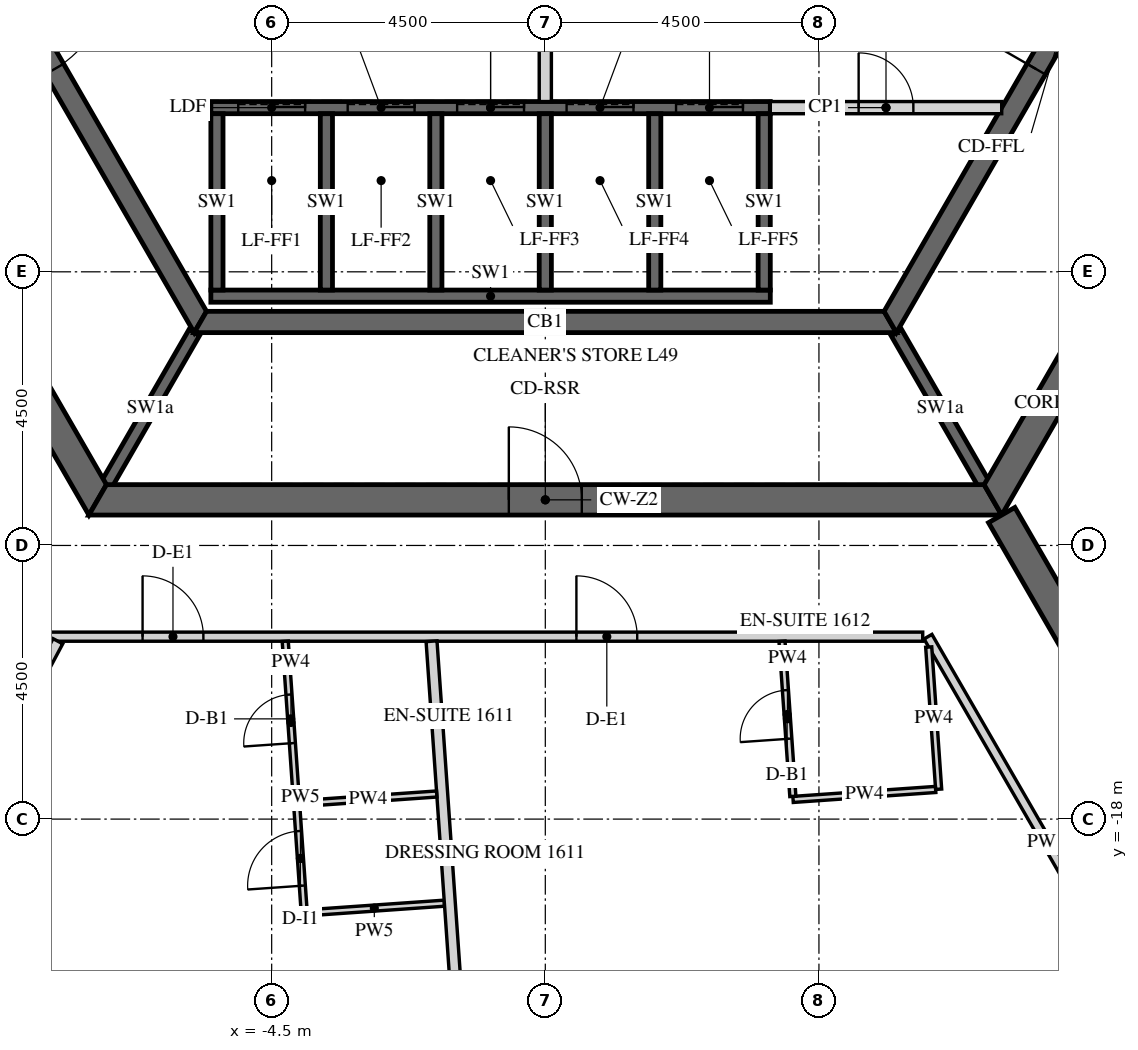
"""IFC4 building model, lengths in metres.
Left out: names, types, materials, properties, quantities, classifications, styles, units other than length and angle.
Written with IfcOpenShell. Run it as: python <this file> out.ifc"""

import sys

from ifc_helpers import new_model, si_unit, direction, frame, frame_2d, origin, place, context, subcontext, project, spatial, polyline, rectangle, outline, extrude, element, fill, save


model = new_model("IFC4")
c1 = context("Model", 3, precision=1e-05, world=origin(), true_north=direction((0.0, 1.0)))
c2 = subcontext(c1, "Body", "Model", "MODEL_VIEW")
j1 = project(units=[si_unit("LENGTHUNIT", "METRE"), si_unit("PLANEANGLEUNIT", "RADIAN")], contexts=[c1])
p1 = place(None, origin())
s1 = spatial("IfcSite", under=j1, at=p1, CompositionType="ELEMENT")
p2 = place(p1, origin())
s2 = spatial("IfcBuilding", under=s1, at=p2, CompositionType="ELEMENT")
p3 = place(p2, frame((0.0, 0.0, 207.3)))
s3 = spatial("IfcBuildingStorey", under=s2, at=p3, CompositionType="ELEMENT", Elevation=207.3)
p4 = place(p3, frame((-14.722, 0.0, -0.15), z_axis=(0.0, 0.0, 1.0), x_axis=(0.50000571537, -0.866022103989, 0.0)))
e1 = element("IfcWall", 1, at=p4, inside=s3, PredefinedType="SHEAR", context=c2, shape_type="SweptSolid", body=[
    extrude(outline(polyline([(-0.144, -0.25), (14.867, -0.25), (14.578, 0.25), (0.144, 0.25), (-0.144, -0.25)])), origin(), (0.0, 0.0, 1.0), 3.9),
])
p5 = place(p4, frame((6.432, 0.0, 0.15)))
e2 = element("IfcOpeningElement", 2, at=p5, cuts=e1, PredefinedType="OPENING", context=c2, shape_type="SweptSolid", body=[
    extrude(rectangle(XDim=1.8, YDim=2.4, at=frame_2d((0.9, 1.2))), frame((0.0, 0.26, 0.0), z_axis=(0.0, -1.0, 0.0), x_axis=(1.0, 0.0, 0.0)), (0.0, 0.0, 1.0), 0.52),
])
p6 = place(p3, frame((-7.361, -12.75, -0.15), z_axis=(0.0, 0.0, 1.0), x_axis=(1.0, 0.0, 0.0)))
e3 = element("IfcWall", 3, at=p6, inside=s3, PredefinedType="SHEAR", context=c2, shape_type="SweptSolid", body=[
    extrude(outline(polyline([(-0.144, -0.25), (14.866, -0.25), (14.578, 0.25), (0.144, 0.25), (-0.144, -0.25)])), origin(), (0.0, 0.0, 1.0), 3.9),
])
p7 = place(p6, frame((6.761, 0.0, 0.15)))
e4 = element("IfcOpeningElement", 4, at=p7, cuts=e3, PredefinedType="OPENING", context=c2, shape_type="SweptSolid", body=[
    extrude(rectangle(XDim=1.2, YDim=2.4, at=frame_2d((0.6, 1.2))), frame((0.0, 0.26, 0.0), z_axis=(0.0, -1.0, 0.0), x_axis=(1.0, 0.0, 0.0)), (0.0, 0.0, 1.0), 0.52),
])
p8 = place(p3, frame((7.361, -12.75, -0.15), z_axis=(0.0, 0.0, 1.0), x_axis=(0.50000571537, 0.866022103989, 0.0)))
e5 = element("IfcWall", 5, at=p8, inside=s3, PredefinedType="SHEAR", context=c2, shape_type="SweptSolid", body=[
    extrude(outline(polyline([(-0.144, -0.25), (14.867, -0.25), (14.578, 0.25), (0.144, 0.25), (-0.144, -0.25)])), origin(), (0.0, 0.0, 1.0), 3.9),
])
p9 = place(p8, frame((6.49, 0.0, 0.15)))
e6 = element("IfcOpeningElement", 6, at=p9, cuts=e5, PredefinedType="OPENING", context=c2, shape_type="SweptSolid", body=[
    extrude(rectangle(XDim=1.8, YDim=2.4, at=frame_2d((0.9, 1.2))), frame((0.0, 0.26, 0.0), z_axis=(0.0, -1.0, 0.0), x_axis=(1.0, 0.0, 0.0)), (0.0, 0.0, 1.0), 0.52),
])
p10 = place(p3, frame((7.506, -13.0, -0.15), z_axis=(0.0, 0.0, 1.0), x_axis=(0.499988271576, -0.866032175087, 0.0)))
e7 = element("IfcWall", 7, at=p10, inside=s3, PredefinedType="SHEAR", context=c2, shape_type="SweptSolid", body=[
    extrude(rectangle(XDim=15.424, YDim=0.5, at=frame_2d((7.712, 0.0))), origin(), (0.0, 0.0, 1.0), 3.9),
])
p11 = place(p10, frame((6.812, 0.0, 0.15)))
e8 = element("IfcOpeningElement", 8, at=p11, cuts=e7, PredefinedType="OPENING", context=c2, shape_type="SweptSolid", body=[
    extrude(rectangle(XDim=1.8, YDim=2.4, at=frame_2d((0.9, 1.2))), frame((0.0, 0.26, 0.0), z_axis=(0.0, -1.0, 0.0), x_axis=(1.0, 0.0, 0.0)), (0.0, 0.0, 1.0), 0.52),
])
p12 = place(p3, frame((-11.345, 0.0, -0.15), z_axis=(0.0, 0.0, 1.0), x_axis=(0.499995046907, -0.866028263435, 0.0)))
e9 = element("IfcWall", 9, at=p12, inside=s3, PredefinedType="SHEAR", context=c2, shape_type="SweptSolid", body=[
    extrude(outline(polyline([(-0.101, -0.175), (11.446, -0.175), (11.244, 0.175), (0.101, 0.175), (-0.101, -0.175)])), origin(), (0.0, 0.0, 1.0), 3.9),
])
p13 = place(p12, frame((4.744, 0.0, 0.15)))
e10 = element("IfcOpeningElement", 10, at=p13, cuts=e9, PredefinedType="OPENING", context=c2, shape_type="SweptSolid", body=[
    extrude(rectangle(XDim=1.8, YDim=2.4, at=frame_2d((0.9, 1.2))), frame((0.0, 0.185, 0.0), z_axis=(0.0, -1.0, 0.0), x_axis=(1.0, 0.0, 0.0)), (0.0, 0.0, 1.0), 0.37),
])
p14 = place(p3, frame((-5.673, -9.825, -0.15), z_axis=(0.0, 0.0, 1.0), x_axis=(1.0, 0.0, 0.0)))
e11 = element("IfcWall", 11, at=p14, inside=s3, PredefinedType="SHEAR", context=c2, shape_type="SweptSolid", body=[
    extrude(outline(polyline([(-0.101, -0.175), (11.446, -0.175), (11.244, 0.175), (0.101, 0.175), (-0.101, -0.175)])), origin(), (0.0, 0.0, 1.0), 3.9),
])
p15 = place(p3, frame((5.673, -9.825, -0.15), z_axis=(0.0, 0.0, 1.0), x_axis=(0.499995046907, 0.866028263435, 0.0)))
e12 = element("IfcWall", 12, at=p15, inside=s3, PredefinedType="SHEAR", context=c2, shape_type="SweptSolid", body=[
    extrude(outline(polyline([(-0.101, -0.175), (11.446, -0.175), (11.244, 0.175), (0.101, 0.175), (-0.101, -0.175)])), origin(), (0.0, 0.0, 1.0), 3.9),
])
p16 = place(p15, frame((4.801, 0.0, 0.15)))
e13 = element("IfcOpeningElement", 13, at=p16, cuts=e12, PredefinedType="OPENING", context=c2, shape_type="SweptSolid", body=[
    extrude(rectangle(XDim=1.8, YDim=2.4, at=frame_2d((0.9, 1.2))), frame((0.0, 0.185, 0.0), z_axis=(0.0, -1.0, 0.0), x_axis=(1.0, 0.0, 0.0)), (0.0, 0.0, 1.0), 0.37),
])
p17 = place(p3, frame((-5.5, -6.3, -0.25), z_axis=(0.0, 0.0, 1.0), x_axis=(1.0, 0.0, 0.0)))
e14 = element("IfcWall", 14, at=p17, inside=s3, PredefinedType="SHEAR", context=c2, shape_type="SweptSolid", body=[
    extrude(rectangle(XDim=9.2, YDim=0.2, at=frame_2d((4.6, 0.0))), origin(), (0.0, 0.0, 1.0), 3.9),
])
p18 = place(p17, frame((0.45, 0.0, 0.25)))
e15 = element("IfcOpeningElement", 15, at=p18, cuts=e14, PredefinedType="OPENING", context=c2, shape_type="SweptSolid", body=[
    extrude(rectangle(XDim=1.1, YDim=2.1, at=frame_2d((0.55, 1.05))), frame((0.0, 0.11, 0.0), z_axis=(0.0, -1.0, 0.0), x_axis=(1.0, 0.0, 0.0)), (0.0, 0.0, 1.0), 0.22),
])
p19 = place(p17, frame((2.25, 0.0, 0.25)))
e16 = element("IfcOpeningElement", 16, at=p19, cuts=e14, PredefinedType="OPENING", context=c2, shape_type="SweptSolid", body=[
    extrude(rectangle(XDim=1.1, YDim=2.1, at=frame_2d((0.55, 1.05))), frame((0.0, 0.11, 0.0), z_axis=(0.0, -1.0, 0.0), x_axis=(1.0, 0.0, 0.0)), (0.0, 0.0, 1.0), 0.22),
])
p20 = place(p17, frame((4.05, 0.0, 0.25)))
e17 = element("IfcOpeningElement", 17, at=p20, cuts=e14, PredefinedType="OPENING", context=c2, shape_type="SweptSolid", body=[
    extrude(rectangle(XDim=1.1, YDim=2.1, at=frame_2d((0.55, 1.05))), frame((0.0, 0.11, 0.0), z_axis=(0.0, -1.0, 0.0), x_axis=(1.0, 0.0, 0.0)), (0.0, 0.0, 1.0), 0.22),
])
p21 = place(p17, frame((5.85, 0.0, 0.25)))
e18 = element("IfcOpeningElement", 18, at=p21, cuts=e14, PredefinedType="OPENING", context=c2, shape_type="SweptSolid", body=[
    extrude(rectangle(XDim=1.1, YDim=2.1, at=frame_2d((0.55, 1.05))), frame((0.0, 0.11, 0.0), z_axis=(0.0, -1.0, 0.0), x_axis=(1.0, 0.0, 0.0)), (0.0, 0.0, 1.0), 0.22),
])
p22 = place(p17, frame((7.65, 0.0, 0.25)))
e19 = element("IfcOpeningElement", 19, at=p22, cuts=e14, PredefinedType="OPENING", context=c2, shape_type="SweptSolid", body=[
    extrude(rectangle(XDim=1.1, YDim=2.1, at=frame_2d((0.55, 1.05))), frame((0.0, 0.11, 0.0), z_axis=(0.0, -1.0, 0.0), x_axis=(1.0, 0.0, 0.0)), (0.0, 0.0, 1.0), 0.22),
])
p23 = place(p3, frame((-5.5, -9.4, -0.25), z_axis=(0.0, 0.0, 1.0), x_axis=(1.0, 0.0, 0.0)))
e20 = element("IfcWall", 20, at=p23, inside=s3, PredefinedType="SHEAR", context=c2, shape_type="SweptSolid", body=[
    extrude(rectangle(XDim=9.2, YDim=0.2, at=frame_2d((4.6, 0.0))), origin(), (0.0, 0.0, 1.0), 3.9),
])
for number, where, z_axis, x_axis in (
    (21, (-5.4, -9.3, -0.25), (0.0, 0.0, 1.0), (0.0, 1.0, 0.0)),
    (22, (-3.6, -9.3, -0.25), (0.0, 0.0, 1.0), (0.0, 1.0, 0.0)),
    (23, (-1.8, -9.3, -0.25), (0.0, 0.0, 1.0), (0.0, 1.0, 0.0)),
    (24, (0.0, -9.3, -0.25), (0.0, 0.0, 1.0), (0.0, 1.0, 0.0)),
    (25, (1.8, -9.3, -0.25), (0.0, 0.0, 1.0), (0.0, 1.0, 0.0)),
    (26, (3.6, -9.3, -0.25), (0.0, 0.0, 1.0), (0.0, 1.0, 0.0)),
):
    element("IfcWall", number, at=place(p3, frame(where, z_axis=z_axis, x_axis=x_axis)), inside=s3, PredefinedType="SHEAR", context=c2, shape_type="SweptSolid", body=[
        extrude(rectangle(XDim=2.9, YDim=0.2, at=frame_2d((1.45, 0.0))), origin(), (0.0, 0.0, 1.0), 3.9),
    ])
p24 = place(p3, frame((0.0, -6.2, 0.0), z_axis=(0.0, 0.0, 1.0), x_axis=(0.0, 1.0, 0.0)))
e27 = element("IfcWall", 27, at=p24, inside=s3, PredefinedType="PARTITIONING", context=c2, shape_type="SweptSolid", body=[
    extrude(rectangle(XDim=6.1, YDim=0.2, at=frame_2d((3.05, 0.0))), origin(), (0.0, 0.0, 1.0), 3.65),
])
p25 = place(p3, frame((3.7, -6.3, 0.0), z_axis=(0.0, 0.0, 1.0), x_axis=(1.0, 0.0, 0.0)))
e28 = element("IfcWall", 28, at=p25, inside=s3, PredefinedType="PARTITIONING", context=c2, shape_type="SweptSolid", body=[
    extrude(rectangle(XDim=3.806, YDim=0.2, at=frame_2d((1.903, 0.0))), origin(), (0.0, 0.0, 1.0), 3.65),
])
p26 = place(p25, frame((1.453, 0.0, 0.0)))
e29 = element("IfcOpeningElement", 29, at=p26, cuts=e28, PredefinedType="OPENING", context=c2, shape_type="SweptSolid", body=[
    extrude(rectangle(XDim=0.9, YDim=2.1, at=frame_2d((0.45, 1.05))), frame((0.0, 0.11, 0.0), z_axis=(0.0, -1.0, 0.0), x_axis=(1.0, 0.0, 0.0)), (0.0, 0.0, 1.0), 0.22),
])
for number, where, z_axis, x_axis in (
    (30, (-5.773, -10.0, -0.15), (0.0, 0.0, 1.0), (-0.5, -0.866, 0.0)),
    (31, (5.773, -10.0, -0.15), (0.0, 0.0, 1.0), (0.5, -0.866, 0.0)),
):
    element("IfcWall", number, at=place(p3, frame(where, z_axis=z_axis, x_axis=x_axis)), inside=s3, PredefinedType="SHEAR", context=c2, shape_type="SweptSolid", body=[
        extrude(rectangle(XDim=2.887, YDim=0.2, at=frame_2d((1.443, 0.0))), origin(), (0.0, 0.0, 1.0), 3.9),
    ])
p27 = place(p3, frame((-8.574, -15.0, 0.0), z_axis=(0.0, 0.0, 1.0), x_axis=(1.0, 0.0, 0.0)))
e32 = element("IfcWall", 32, at=p27, inside=s3, PredefinedType="PARTITIONING", context=c2, shape_type="SweptSolid", body=[
    extrude(rectangle(XDim=14.78, YDim=0.15, at=frame_2d((7.39, 0.0))), origin(), (0.0, 0.0, 1.0), 2.988),
])
p28 = place(p27, frame((1.951, 0.0, 0.0)))
e33 = element("IfcOpeningElement", 33, at=p28, cuts=e32, PredefinedType="OPENING", context=c2, shape_type="SweptSolid", body=[
    extrude(rectangle(XDim=1.0, YDim=2.1, at=frame_2d((0.5, 1.05))), frame((0.0, 0.085, 0.0), z_axis=(0.0, -1.0, 0.0), x_axis=(1.0, 0.0, 0.0)), (0.0, 0.0, 1.0), 0.17),
])
p29 = place(p27, frame((9.085, 0.0, 0.0)))
e34 = element("IfcOpeningElement", 34, at=p29, cuts=e32, PredefinedType="OPENING", context=c2, shape_type="SweptSolid", body=[
    extrude(rectangle(XDim=1.0, YDim=2.1, at=frame_2d((0.5, 1.05))), frame((0.0, 0.085, 0.0), z_axis=(0.0, -1.0, 0.0), x_axis=(1.0, 0.0, 0.0)), (0.0, 0.0, 1.0), 0.17),
])
p30 = place(p3, frame((6.293, -15.0, 0.0), z_axis=(0.0, 0.0, 1.0), x_axis=(0.499980313799, -0.86603676932, 0.0)))
e35 = element("IfcWall", 35, at=p30, inside=s3, PredefinedType="PARTITIONING", context=c2, shape_type="SweptSolid", body=[
    extrude(rectangle(XDim=7.786, YDim=0.15, at=frame_2d((3.893, 0.0))), origin(), (0.0, 0.0, 1.0), 2.988),
])
p31 = place(p3, frame((-14.876, -27.977, 0.0), z_axis=(0.0, 0.0, 1.0), x_axis=(0.469468328163, 0.882949312731, 0.0)))
e36 = element("IfcWall", 36, at=p31, inside=s3, PredefinedType="PARTITIONING", context=c2, shape_type="SweptSolid", body=[
    extrude(rectangle(XDim=14.613, YDim=0.18, at=frame_2d((7.306, 0.0))), origin(), (0.0, 0.0, 1.0), 2.988),
])
p32 = place(p3, frame((-4.09, -17.748, 0.0), z_axis=(0.0, 0.0, 1.0), x_axis=(-0.069783798956, 0.997562139119, 0.0)))
e37 = element("IfcWall", 37, at=p32, inside=s3, PredefinedType="PARTITIONING", context=c2, shape_type="SweptSolid", body=[
    extrude(rectangle(XDim=2.68, YDim=0.1, at=frame_2d((1.34, 0.0))), origin(), (0.0, 0.0, 1.0), 2.988),
])
p33 = place(p32, frame((1.0, 0.0, 0.0)))
e38 = element("IfcOpeningElement", 38, at=p33, cuts=e37, PredefinedType="OPENING", context=c2, shape_type="SweptSolid", body=[
    extrude(rectangle(XDim=0.8, YDim=2.1, at=frame_2d((0.4, 1.05))), frame((0.0, 0.06, 0.0), z_axis=(0.0, -1.0, 0.0), x_axis=(1.0, 0.0, 0.0)), (0.0, 0.0, 1.0), 0.12),
])
p34 = place(p3, frame((-1.66, -19.383, 0.0), z_axis=(0.0, 0.0, 1.0), x_axis=(-0.997564338377, -0.069752353356, 0.0)))
e39 = element("IfcWall", 39, at=p34, inside=s3, PredefinedType="PARTITIONING", context=c2, shape_type="SweptSolid", body=[
    extrude(rectangle(XDim=2.31, YDim=0.1, at=frame_2d((1.155, 0.0))), origin(), (0.0, 0.0, 1.0), 2.988),
])
p35 = place(p3, frame((-3.968, -19.494, 0.0), z_axis=(0.0, 0.0, 1.0), x_axis=(-0.069797686069, 0.997561167558, 0.0)))
e40 = element("IfcWall", 40, at=p35, inside=s3, PredefinedType="PARTITIONING", context=c2, shape_type="SweptSolid", body=[
    extrude(rectangle(XDim=1.7, YDim=0.1, at=frame_2d((0.85, 0.0))), origin(), (0.0, 0.0, 1.0), 2.988),
])
p36 = place(p35, frame((0.4, 0.0, 0.0)))
e41 = element("IfcOpeningElement", 41, at=p36, cuts=e40, PredefinedType="OPENING", context=c2, shape_type="SweptSolid", body=[
    extrude(rectangle(XDim=0.9, YDim=2.1, at=frame_2d((0.45, 1.05))), frame((0.0, 0.06, 0.0), z_axis=(0.0, -1.0, 0.0), x_axis=(1.0, 0.0, 0.0)), (0.0, 0.0, 1.0), 0.12),
])
p37 = place(p3, frame((-0.996, -27.587, 0.0), z_axis=(0.0, 0.0, 1.0), x_axis=(-0.069744671963, 0.997564875451, 0.0)))
e42 = element("IfcWall", 42, at=p37, inside=s3, PredefinedType="PARTITIONING", context=c2, shape_type="SweptSolid", body=[
    extrude(rectangle(XDim=12.542, YDim=0.18, at=frame_2d((6.271, 0.0))), origin(), (0.0, 0.0, 1.0), 2.988),
])
p38 = place(p3, frame((-4.04, -17.745, 0.0), z_axis=(0.0, 0.0, 1.0), x_axis=(0.997562351999, 0.069780755754, 0.0)))
e43 = element("IfcWall", 43, at=p38, inside=s3, PredefinedType="PARTITIONING", context=c2, shape_type="SweptSolid", body=[
    extrude(rectangle(XDim=2.26, YDim=0.1, at=frame_2d((1.13, 0.0))), origin(), (0.0, 0.0, 1.0), 2.988),
])
p39 = place(p3, frame((6.305, -15.171, 0.0), z_axis=(0.0, 0.0, 1.0), x_axis=(0.06967780619, -0.997569548114, 0.0)))
e44 = element("IfcWall", 44, at=p39, inside=s3, PredefinedType="PARTITIONING", context=c2, shape_type="SweptSolid", body=[
    extrude(rectangle(XDim=2.344, YDim=0.1, at=frame_2d((1.172, 0.0))), origin(), (0.0, 0.0, 1.0), 2.988),
])
p40 = place(p3, frame((6.419, -17.512, 0.0), z_axis=(0.0, 0.0, 1.0), x_axis=(-0.997567210304, -0.069711268289, 0.0)))
e45 = element("IfcWall", 45, at=p40, inside=s3, PredefinedType="PARTITIONING", context=c2, shape_type="SweptSolid", body=[
    extrude(rectangle(XDim=2.35, YDim=0.1, at=frame_2d((1.175, 0.0))), origin(), (0.0, 0.0, 1.0), 2.988),
])
p41 = place(p3, frame((4.071, -17.626, 0.0), z_axis=(0.0, 0.0, 1.0), x_axis=(-0.06967999793, 0.997569395024, 0.0)))
e46 = element("IfcWall", 46, at=p41, inside=s3, PredefinedType="PARTITIONING", context=c2, shape_type="SweptSolid", body=[
    extrude(rectangle(XDim=2.558, YDim=0.1, at=frame_2d((1.279, 0.0))), origin(), (0.0, 0.0, 1.0), 2.988),
])
p42 = place(p41, frame((0.95, 0.0, 0.0)))
e47 = element("IfcOpeningElement", 47, at=p42, cuts=e46, PredefinedType="OPENING", context=c2, shape_type="SweptSolid", body=[
    extrude(rectangle(XDim=0.8, YDim=2.1, at=frame_2d((0.4, 1.05))), frame((0.0, 0.06, 0.0), z_axis=(0.0, -1.0, 0.0), x_axis=(1.0, 0.0, 0.0)), (0.0, 0.0, 1.0), 0.12),
])
p43 = place(p7, origin())
e48 = element("IfcDoor", 48, at=p43, inside=s3, OperationType="SINGLE_SWING_LEFT", PredefinedType="DOOR", context=c2, shape_type="SweptSolid", body=[
    extrude(rectangle(XDim=1.2, YDim=2.4, at=frame_2d((0.6, 1.2))), frame((0.0, 0.025, 0.0), z_axis=(0.0, -1.0, 0.0), x_axis=(1.0, 0.0, 0.0)), (0.0, 0.0, 1.0), 0.05),
])
fill(e4, e48)
p44 = place(p13, origin())
e49 = element("IfcDoor", 49, at=p44, inside=s3, OperationType="DOUBLE_DOOR_SINGLE_SWING", PredefinedType="DOOR", context=c2, shape_type="SweptSolid", body=[
    extrude(rectangle(XDim=1.8, YDim=2.4, at=frame_2d((0.9, 1.2))), frame((0.0, 0.025, 0.0), z_axis=(0.0, -1.0, 0.0), x_axis=(1.0, 0.0, 0.0)), (0.0, 0.0, 1.0), 0.05),
])
fill(e10, e49)
p45 = place(p16, origin())
e50 = element("IfcDoor", 50, at=p45, inside=s3, OperationType="DOUBLE_DOOR_SINGLE_SWING", PredefinedType="DOOR", context=c2, shape_type="SweptSolid", body=[
    extrude(rectangle(XDim=1.8, YDim=2.4, at=frame_2d((0.9, 1.2))), frame((0.0, 0.025, 0.0), z_axis=(0.0, -1.0, 0.0), x_axis=(1.0, 0.0, 0.0)), (0.0, 0.0, 1.0), 0.05),
])
fill(e13, e50)
p46 = place(p26, origin())
e51 = element("IfcDoor", 51, at=p46, inside=s3, OperationType="SINGLE_SWING_LEFT", PredefinedType="DOOR", context=c2, shape_type="SweptSolid", body=[
    extrude(rectangle(XDim=0.9, YDim=2.1, at=frame_2d((0.45, 1.05))), frame((0.0, 0.025, 0.0), z_axis=(0.0, -1.0, 0.0), x_axis=(1.0, 0.0, 0.0)), (0.0, 0.0, 1.0), 0.05),
])
fill(e29, e51)
p47 = place(p18, origin())
e52 = element("IfcDoor", 52, at=p47, inside=s3, OperationType="SLIDING_TO_LEFT", PredefinedType="DOOR", context=c2, shape_type="SweptSolid", body=[
    extrude(rectangle(XDim=1.1, YDim=2.1, at=frame_2d((0.55, 1.05))), frame((0.0, 0.025, 0.0), z_axis=(0.0, -1.0, 0.0), x_axis=(1.0, 0.0, 0.0)), (0.0, 0.0, 1.0), 0.05),
])
fill(e15, e52)
p48 = place(p19, origin())
e53 = element("IfcDoor", 53, at=p48, inside=s3, OperationType="SLIDING_TO_LEFT", PredefinedType="DOOR", context=c2, shape_type="SweptSolid", body=[
    extrude(rectangle(XDim=1.1, YDim=2.1, at=frame_2d((0.55, 1.05))), frame((0.0, 0.025, 0.0), z_axis=(0.0, -1.0, 0.0), x_axis=(1.0, 0.0, 0.0)), (0.0, 0.0, 1.0), 0.05),
])
fill(e16, e53)
p49 = place(p20, origin())
e54 = element("IfcDoor", 54, at=p49, inside=s3, OperationType="SLIDING_TO_LEFT", PredefinedType="DOOR", context=c2, shape_type="SweptSolid", body=[
    extrude(rectangle(XDim=1.1, YDim=2.1, at=frame_2d((0.55, 1.05))), frame((0.0, 0.025, 0.0), z_axis=(0.0, -1.0, 0.0), x_axis=(1.0, 0.0, 0.0)), (0.0, 0.0, 1.0), 0.05),
])
fill(e17, e54)
p50 = place(p21, origin())
e55 = element("IfcDoor", 55, at=p50, inside=s3, OperationType="SLIDING_TO_LEFT", PredefinedType="DOOR", context=c2, shape_type="SweptSolid", body=[
    extrude(rectangle(XDim=1.1, YDim=2.1, at=frame_2d((0.55, 1.05))), frame((0.0, 0.025, 0.0), z_axis=(0.0, -1.0, 0.0), x_axis=(1.0, 0.0, 0.0)), (0.0, 0.0, 1.0), 0.05),
])
fill(e18, e55)
p51 = place(p22, origin())
e56 = element("IfcDoor", 56, at=p51, inside=s3, OperationType="SLIDING_TO_LEFT", PredefinedType="DOOR", context=c2, shape_type="SweptSolid", body=[
    extrude(rectangle(XDim=1.1, YDim=2.1, at=frame_2d((0.55, 1.05))), frame((0.0, 0.025, 0.0), z_axis=(0.0, -1.0, 0.0), x_axis=(1.0, 0.0, 0.0)), (0.0, 0.0, 1.0), 0.05),
])
fill(e19, e56)
p52 = place(p28, origin())
e57 = element("IfcDoor", 57, at=p52, inside=s3, OperationType="SINGLE_SWING_LEFT", PredefinedType="DOOR", context=c2, shape_type="SweptSolid", body=[
    extrude(rectangle(XDim=1.0, YDim=2.1, at=frame_2d((0.5, 1.05))), frame((0.0, 0.025, 0.0), z_axis=(0.0, -1.0, 0.0), x_axis=(1.0, 0.0, 0.0)), (0.0, 0.0, 1.0), 0.05),
])
fill(e33, e57)
p53 = place(p33, origin())
e58 = element("IfcDoor", 58, at=p53, inside=s3, OperationType="SINGLE_SWING_LEFT", PredefinedType="DOOR", context=c2, shape_type="SweptSolid", body=[
    extrude(rectangle(XDim=0.8, YDim=2.1, at=frame_2d((0.4, 1.05))), frame((0.0, 0.025, 0.0), z_axis=(0.0, -1.0, 0.0), x_axis=(1.0, 0.0, 0.0)), (0.0, 0.0, 1.0), 0.05),
])
fill(e38, e58)
p54 = place(p36, origin())
e59 = element("IfcDoor", 59, at=p54, inside=s3, OperationType="SINGLE_SWING_RIGHT", PredefinedType="DOOR", context=c2, shape_type="SweptSolid", body=[
    extrude(rectangle(XDim=0.9, YDim=2.1, at=frame_2d((0.45, 1.05))), frame((0.0, 0.025, 0.0), z_axis=(0.0, -1.0, 0.0), x_axis=(1.0, 0.0, 0.0)), (0.0, 0.0, 1.0), 0.05),
])
fill(e41, e59)
p55 = place(p29, origin())
e60 = element("IfcDoor", 60, at=p55, inside=s3, OperationType="SINGLE_SWING_RIGHT", PredefinedType="DOOR", context=c2, shape_type="SweptSolid", body=[
    extrude(rectangle(XDim=1.0, YDim=2.1, at=frame_2d((0.5, 1.05))), frame((0.0, 0.025, 0.0), z_axis=(0.0, -1.0, 0.0), x_axis=(1.0, 0.0, 0.0)), (0.0, 0.0, 1.0), 0.05),
])
fill(e34, e60)
p56 = place(p42, origin())
e61 = element("IfcDoor", 61, at=p56, inside=s3, OperationType="SINGLE_SWING_LEFT", PredefinedType="DOOR", context=c2, shape_type="SweptSolid", body=[
    extrude(rectangle(XDim=0.8, YDim=2.1, at=frame_2d((0.4, 1.05))), frame((0.0, 0.025, 0.0), z_axis=(0.0, -1.0, 0.0), x_axis=(1.0, 0.0, 0.0)), (0.0, 0.0, 1.0), 0.05),
])
fill(e47, e61)
save(model, sys.argv[1])
